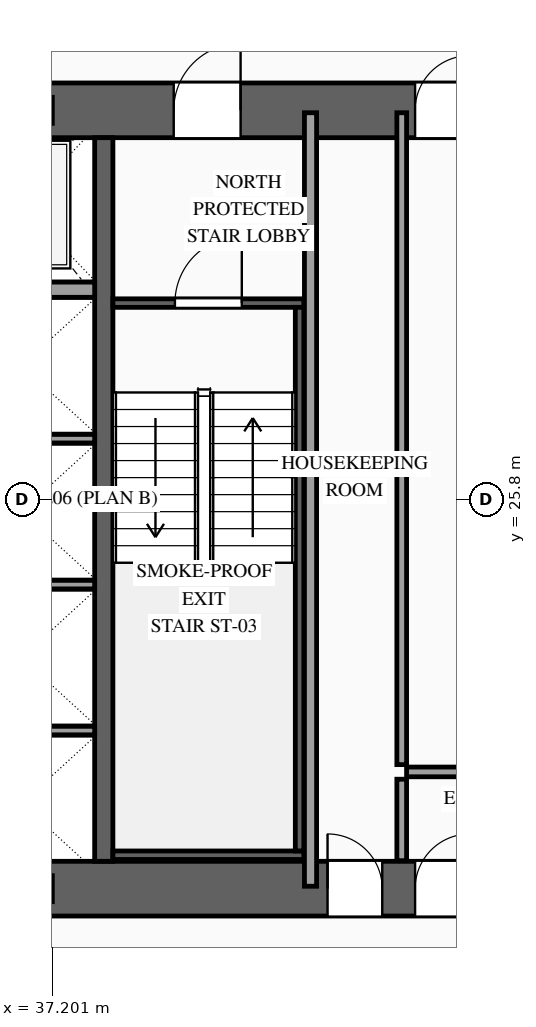
"""IFC4 building model, lengths in metres.
Left out: names, types, materials, properties, quantities, classifications, styles, units other than length and angle.
Written with IfcOpenShell. Run it as: python <this file> out.ifc"""

import sys

from ifc_helpers import new_model, si_unit, direction, frame, frame_2d, origin, origin_2d, place, context, subcontext, project, spatial, rectangle, i_section, extrude, source, transform, mapped, element, fill, save


model = new_model("IFC4")
c1 = context("Model", 3, precision=1e-05, world=origin(), true_north=direction((0.0, 1.0)))
c2 = subcontext(c1, "Body", "Model", "MODEL_VIEW")
j1 = project(units=[si_unit("LENGTHUNIT", "METRE"), si_unit("PLANEANGLEUNIT", "RADIAN")], contexts=[c1])
p1 = place(None, origin())
s1 = spatial("IfcSite", under=j1, at=p1, CompositionType="ELEMENT")
p2 = place(p1, origin())
s2 = spatial("IfcBuilding", under=s1, at=p2, CompositionType="ELEMENT")
p3 = place(p2, frame((0.0, 0.0, 60.4)))
s3 = spatial("IfcBuildingStorey", under=s2, at=p3, CompositionType="ELEMENT", Elevation=60.4)
p4 = place(p3, frame((23.35, 19.4, 0.0), z_axis=(0.0, 0.0, 1.0), x_axis=(1.0, 0.0, 0.0)))
e1 = element("IfcWall", 1, at=p4, inside=s3, PredefinedType="SHEAR", context=c2, shape_type="SweptSolid", body=[
    extrude(rectangle(XDim=27.3, YDim=0.9, at=frame_2d((13.65, 0.0))), origin(), (0.0, 0.0, 1.0), 3.6),
])
p5 = place(p4, frame((2.1, 0.0, 0.0)))
e2 = element("IfcOpeningElement", 2, at=p5, cuts=e1, PredefinedType="OPENING", context=c2, shape_type="SweptSolid", body=[
    extrude(rectangle(XDim=1.1, YDim=2.2, at=frame_2d((0.55, 1.1))), frame((0.0, 0.465, 0.0), z_axis=(0.0, -1.0, 0.0), x_axis=(1.0, 0.0, 0.0)), (0.0, 0.0, 1.0), 0.93),
])
p6 = place(p4, frame((10.0, 0.0, 0.0)))
e3 = element("IfcOpeningElement", 3, at=p6, cuts=e1, PredefinedType="OPENING", context=c2, shape_type="SweptSolid", body=[
    extrude(rectangle(XDim=1.1, YDim=2.2, at=frame_2d((0.55, 1.1))), frame((0.0, 0.465, 0.0), z_axis=(0.0, -1.0, 0.0), x_axis=(1.0, 0.0, 0.0)), (0.0, 0.0, 1.0), 0.93),
])
p7 = place(p4, frame((23.2, 0.0, 0.0)))
e4 = element("IfcOpeningElement", 4, at=p7, cuts=e1, PredefinedType="OPENING", context=c2, shape_type="SweptSolid", body=[
    extrude(rectangle(XDim=1.1, YDim=2.2, at=frame_2d((0.55, 1.1))), frame((0.0, 0.465, 0.0), z_axis=(0.0, -1.0, 0.0), x_axis=(1.0, 0.0, 0.0)), (0.0, 0.0, 1.0), 0.93),
])
p8 = place(p4, frame((19.82, 0.0, 0.0)))
e5 = element("IfcOpeningElement", 5, at=p8, cuts=e1, PredefinedType="OPENING", context=c2, shape_type="SweptSolid", body=[
    extrude(rectangle(XDim=0.9, YDim=2.15, at=frame_2d((0.45, 1.075))), frame((0.0, 0.465, 0.0), z_axis=(0.0, -1.0, 0.0), x_axis=(1.0, 0.0, 0.0)), (0.0, 0.0, 1.0), 0.93),
])
p9 = place(p4, frame((18.38, 0.0, 0.0)))
e6 = element("IfcOpeningElement", 6, at=p9, cuts=e1, PredefinedType="OPENING", context=c2, shape_type="SweptSolid", body=[
    extrude(rectangle(XDim=0.9, YDim=2.15, at=frame_2d((0.45, 1.075))), frame((0.0, 0.465, 0.0), z_axis=(0.0, -1.0, 0.0), x_axis=(1.0, 0.0, 0.0)), (0.0, 0.0, 1.0), 0.93),
])
p10 = place(p3, frame((23.35, 32.2, 0.0), z_axis=(0.0, 0.0, 1.0), x_axis=(1.0, 0.0, 0.0)))
e7 = element("IfcWall", 7, at=p10, inside=s3, PredefinedType="SHEAR", context=c2, shape_type="SweptSolid", body=[
    extrude(rectangle(XDim=27.3, YDim=0.9, at=frame_2d((13.65, 0.0))), origin(), (0.0, 0.0, 1.0), 3.6),
])
p11 = place(p10, frame((4.72, 0.0, 0.0)))
e8 = element("IfcOpeningElement", 8, at=p11, cuts=e7, PredefinedType="OPENING", context=c2, shape_type="SweptSolid", body=[
    extrude(rectangle(XDim=0.9, YDim=2.15, at=frame_2d((0.45, 1.075))), frame((0.0, 0.465, 0.0), z_axis=(0.0, -1.0, 0.0), x_axis=(1.0, 0.0, 0.0)), (0.0, 0.0, 1.0), 0.93),
])
p12 = place(p10, frame((10.0, 0.0, 0.0)))
e9 = element("IfcOpeningElement", 9, at=p12, cuts=e7, PredefinedType="OPENING", context=c2, shape_type="SweptSolid", body=[
    extrude(rectangle(XDim=1.1, YDim=2.2, at=frame_2d((0.55, 1.1))), frame((0.0, 0.465, 0.0), z_axis=(0.0, -1.0, 0.0), x_axis=(1.0, 0.0, 0.0)), (0.0, 0.0, 1.0), 0.93),
])
p13 = place(p10, frame((15.85, 0.0, 0.0)))
e10 = element("IfcOpeningElement", 10, at=p13, cuts=e7, PredefinedType="OPENING", context=c2, shape_type="SweptSolid", body=[
    extrude(rectangle(XDim=1.1, YDim=2.2, at=frame_2d((0.55, 1.1))), frame((0.0, 0.465, 0.0), z_axis=(0.0, -1.0, 0.0), x_axis=(1.0, 0.0, 0.0)), (0.0, 0.0, 1.0), 0.93),
])
p14 = place(p10, frame((19.82, 0.0, 0.0)))
e11 = element("IfcOpeningElement", 11, at=p14, cuts=e7, PredefinedType="OPENING", context=c2, shape_type="SweptSolid", body=[
    extrude(rectangle(XDim=0.9, YDim=2.15, at=frame_2d((0.45, 1.075))), frame((0.0, 0.465, 0.0), z_axis=(0.0, -1.0, 0.0), x_axis=(1.0, 0.0, 0.0)), (0.0, 0.0, 1.0), 0.93),
])
m1 = source(origin(), c2, "Body", "SweptSolid", [
    extrude(rectangle(XDim=11.9, YDim=0.3, at=frame_2d((5.95, 0.0))), origin(), (0.0, 0.0, 1.0), 3.6),
])
p15 = place(p3, frame((38.05, 19.85, 0.0), z_axis=(0.0, 0.0, 1.0), x_axis=(0.0, 1.0, 0.0)))
e12 = element("IfcWall", 12, at=p15, inside=s3, PredefinedType="SOLIDWALL", context=c2, shape_type="MappedRepresentation", body=[
    mapped(m1, transform((0.0, 0.0, 0.0), scale=1.0)),
])
m2 = source(origin(), c2, "Body", "SweptSolid", [
    extrude(i_section(OverallWidth=0.407, OverallDepth=0.428, WebThickness=0.02, FlangeThickness=0.035, at=origin_2d()), origin(), (0.0, 0.0, 1.0), 3.6),
])
for number, where, z_axis, x_axis in (
    (13, (37.0, 19.4, 0.0), (0.0, 0.0, 1.0), (1.0, 0.0, 0.0)),
    (14, (37.0, 32.2, 0.0), (0.0, 0.0, 1.0), (1.0, 0.0, 0.0)),
):
    element("IfcColumn", number, at=place(p3, frame(where, z_axis=z_axis, x_axis=x_axis)), inside=s3, PredefinedType="COLUMN", context=c2, shape_type="MappedRepresentation", body=[
        mapped(m2, transform((0.0, 0.0, 0.0), scale=1.0)),
    ])
m3 = source(origin(), c2, "Body", "SweptSolid", [
    extrude(rectangle(XDim=2.4, YDim=0.14, at=frame_2d((1.2, 0.0))), origin(), (0.0, 0.0, 1.0), 3.38),
])
for number, where, z_axis, x_axis in (
    (15, (35.5, 22.0, 0.0), (0.0, 0.0, 1.0), (1.0, 0.0, 0.0)),
    (16, (35.5, 24.4, 0.0), (0.0, 0.0, 1.0), (1.0, 0.0, 0.0)),
    (17, (35.5, 26.8, 0.0), (0.0, 0.0, 1.0), (1.0, 0.0, 0.0)),
):
    element("IfcWall", number, at=place(p3, frame(where, z_axis=z_axis, x_axis=x_axis)), inside=s3, PredefinedType="SOLIDWALL", context=c2, shape_type="MappedRepresentation", body=[
        mapped(m3, transform((0.0, 0.0, 0.0), scale=1.0)),
    ])
m4 = source(origin(), c2, "Body", "SweptSolid", [
    extrude(rectangle(XDim=2.4, YDim=0.25, at=frame_2d((1.2, 0.0))), origin(), (0.0, 0.0, 1.0), 3.38),
])
p16 = place(p3, frame((35.5, 29.25, 0.0), z_axis=(0.0, 0.0, 1.0), x_axis=(1.0, 0.0, 0.0)))
e18 = element("IfcWall", 18, at=p16, inside=s3, PredefinedType="SOLIDWALL", context=c2, shape_type="MappedRepresentation", body=[
    mapped(m4, transform((0.0, 0.0, 0.0), scale=1.0)),
])
p17 = place(p3, frame((38.2, 29.03, 0.0), z_axis=(0.0, 0.0, 1.0), x_axis=(1.0, 0.0, 0.0)))
e19 = element("IfcWall", 19, at=p17, inside=s3, PredefinedType="SOLIDWALL", context=c2, shape_type="SweptSolid", body=[
    extrude(rectangle(XDim=3.14, YDim=0.14, at=frame_2d((1.57, 0.0))), origin(), (0.0, 0.0, 1.0), 3.38),
])
p18 = place(p17, frame((1.02, 0.0, 0.0)))
e20 = element("IfcOpeningElement", 20, at=p18, cuts=e19, PredefinedType="OPENING", context=c2, shape_type="SweptSolid", body=[
    extrude(rectangle(XDim=1.1, YDim=2.2, at=frame_2d((0.55, 1.1))), frame((0.0, 0.085, 0.0), z_axis=(0.0, -1.0, 0.0), x_axis=(1.0, 0.0, 0.0)), (0.0, 0.0, 1.0), 0.17),
])
m5 = source(origin(), c2, "Body", "SweptSolid", [
    extrude(rectangle(XDim=3.14, YDim=0.14, at=frame_2d((1.57, 0.0))), origin(), (0.0, 0.0, 1.0), 3.38),
])
p19 = place(p3, frame((38.2, 19.95, 0.0), z_axis=(0.0, 0.0, 1.0), x_axis=(1.0, 0.0, 0.0)))
e21 = element("IfcWall", 21, at=p19, inside=s3, PredefinedType="SOLIDWALL", context=c2, shape_type="MappedRepresentation", body=[
    mapped(m5, transform((0.0, 0.0, 0.0), scale=1.0)),
])
m6 = source(origin(), c2, "Body", "SweptSolid", [
    extrude(rectangle(XDim=8.94, YDim=0.14, at=frame_2d((4.47, 0.0))), origin(), (0.0, 0.0, 1.0), 3.38),
])
p20 = place(p3, frame((41.27, 20.02, 0.0), z_axis=(0.0, 0.0, 1.0), x_axis=(0.0, 1.0, 0.0)))
e22 = element("IfcWall", 22, at=p20, inside=s3, PredefinedType="SOLIDWALL", context=c2, shape_type="MappedRepresentation", body=[
    mapped(m6, transform((0.0, 0.0, 0.0), scale=1.0)),
])
m7 = source(origin(), c2, "Body", "SweptSolid", [
    extrude(rectangle(XDim=1.34, YDim=0.16, at=frame_2d((0.67, 0.0))), origin(), (0.0, 0.0, 1.0), 3.38),
])
p21 = place(p3, frame((42.95, 19.86, 0.0), z_axis=(0.0, 0.0, 1.0), x_axis=(0.0, 1.0, 0.0)))
e23 = element("IfcWall", 23, at=p21, inside=s3, PredefinedType="PARTITIONING", context=c2, shape_type="MappedRepresentation", body=[
    mapped(m7, transform((0.0, 0.0, 0.0), scale=1.0)),
])
m8 = source(origin(), c2, "Body", "SweptSolid", [
    extrude(rectangle(XDim=1.17, YDim=0.16, at=frame_2d((0.585, 0.0))), origin(), (0.0, 0.0, 1.0), 3.38),
])
p22 = place(p3, frame((43.03, 21.32, 0.0), z_axis=(0.0, 0.0, 1.0), x_axis=(1.0, 0.0, 0.0)))
e24 = element("IfcWall", 24, at=p22, inside=s3, PredefinedType="PARTITIONING", context=c2, shape_type="MappedRepresentation", body=[
    mapped(m8, transform((0.0, 0.0, 0.0), scale=1.0)),
])
m9 = source(origin(), c2, "Body", "SweptSolid", [
    extrude(rectangle(XDim=12.72, YDim=0.2, at=frame_2d((6.36, 0.0))), origin(), (0.0, 0.0, 1.0), 3.38),
])
p23 = place(p3, frame((41.45, 19.44, 0.0), z_axis=(0.0, 0.0, 1.0), x_axis=(0.0, 1.0, 0.0)))
e25 = element("IfcWall", 25, at=p23, inside=s3, PredefinedType="PARTITIONING", context=c2, shape_type="MappedRepresentation", body=[
    mapped(m9, transform((0.0, 0.0, 0.0), scale=1.0)),
])
m10 = source(origin(), c2, "Body", "SweptSolid", [
    extrude(rectangle(XDim=10.72, YDim=0.16, at=frame_2d((5.36, 0.0))), origin(), (0.0, 0.0, 1.0), 3.38),
])
p24 = place(p3, frame((42.95, 21.44, 0.0), z_axis=(0.0, 0.0, 1.0), x_axis=(0.0, 1.0, 0.0)))
e26 = element("IfcWall", 26, at=p24, inside=s3, PredefinedType="PARTITIONING", context=c2, shape_type="MappedRepresentation", body=[
    mapped(m10, transform((0.0, 0.0, 0.0), scale=1.0)),
])
m11 = source(origin(), c2, "Body", "SweptSolid", [
    extrude(rectangle(XDim=1.1, YDim=2.2, at=frame_2d((0.55, 1.1))), frame((0.0, 0.025, 0.0), z_axis=(0.0, -1.0, 0.0), x_axis=(1.0, 0.0, 0.0)), (0.0, 0.0, 1.0), 0.05),
])
p25 = place(p18, origin())
e27 = element("IfcDoor", 27, at=p25, inside=s3, OperationType="SINGLE_SWING_RIGHT", PredefinedType="DOOR", context=c2, shape_type="MappedRepresentation", body=[
    mapped(m11, transform((0.0, 0.0, 0.0), scale=1.0)),
])
fill(e20, e27)
p26 = place(p13, origin())
e28 = element("IfcDoor", 28, at=p26, inside=s3, OperationType="SINGLE_SWING_RIGHT", PredefinedType="DOOR", context=c2, shape_type="MappedRepresentation", body=[
    mapped(m11, transform((0.0, 0.0, 0.0), scale=1.0)),
])
fill(e10, e28)
m12 = source(origin(), c2, "Body", "SweptSolid", [
    extrude(rectangle(XDim=0.9, YDim=2.15, at=frame_2d((0.45, 1.075))), frame((0.0, 0.025, 0.0), z_axis=(0.0, -1.0, 0.0), x_axis=(1.0, 0.0, 0.0)), (0.0, 0.0, 1.0), 0.05),
])
p27 = place(p8, origin())
e29 = element("IfcDoor", 29, at=p27, inside=s3, OperationType="SINGLE_SWING_RIGHT", PredefinedType="DOOR", context=c2, shape_type="MappedRepresentation", body=[
    mapped(m12, transform((0.0, 0.0, 0.0), scale=1.0)),
])
fill(e5, e29)
p28 = place(p9, origin())
e30 = element("IfcDoor", 30, at=p28, inside=s3, OperationType="SINGLE_SWING_LEFT", PredefinedType="DOOR", context=c2, shape_type="MappedRepresentation", body=[
    mapped(m12, transform((0.0, 0.0, 0.0), scale=1.0)),
])
fill(e6, e30)
p29 = place(p14, origin())
e31 = element("IfcDoor", 31, at=p29, inside=s3, OperationType="SINGLE_SWING_RIGHT", PredefinedType="DOOR", context=c2, shape_type="MappedRepresentation", body=[
    mapped(m12, transform((0.0, 0.0, 0.0), scale=1.0)),
])
fill(e11, e31)
save(model, sys.argv[1])
